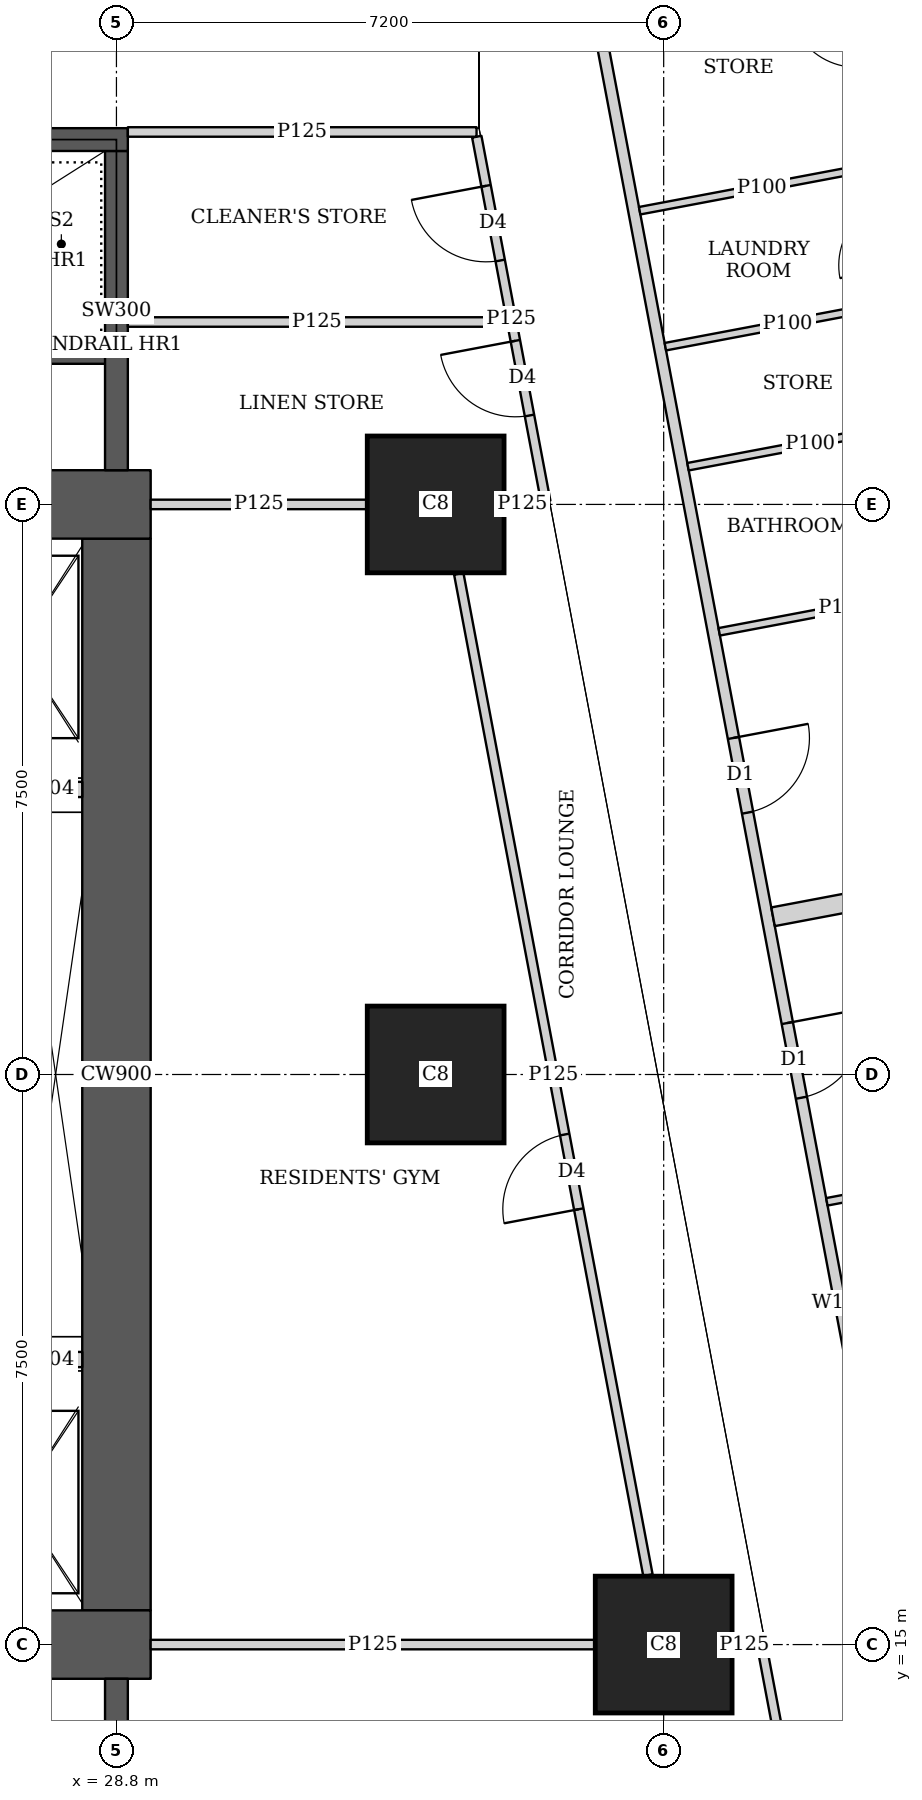
"""IFC4 building model, lengths in metres.
Left out: names, types, materials, properties, quantities, classifications, styles, units other than length and angle.
Written with IfcOpenShell. Run it as: python <this file> out.ifc"""

import sys

from ifc_helpers import new_model, si_unit, direction, frame, frame_2d, origin, origin_2d, place, context, subcontext, project, spatial, rectangle, extrude, element, fill, save


model = new_model("IFC4")
c1 = context("Model", 3, precision=1e-05, world=origin(), true_north=direction((0.0, 1.0)))
c2 = subcontext(c1, "Body", "Model", "MODEL_VIEW")
j1 = project(units=[si_unit("LENGTHUNIT", "METRE"), si_unit("PLANEANGLEUNIT", "RADIAN")], contexts=[c1])
p1 = place(None, origin())
s1 = spatial("IfcSite", under=j1, at=p1, CompositionType="ELEMENT")
p2 = place(p1, origin())
s2 = spatial("IfcBuilding", under=s1, at=p2, CompositionType="ELEMENT")
p3 = place(p2, frame((0.0, 0.0, 53.75)))
s3 = spatial("IfcBuildingStorey", under=s2, at=p3, CompositionType="ELEMENT", Elevation=53.75)
for number, where, z_axis, x_axis in (
    (1, (36.0, 15.0, 0.0), (0.0, 0.0, 1.0), (1.0, 0.0, 0.0)),
    (2, (33.0, 22.5, 0.0), (0.0, 0.0, 1.0), (1.0, 0.0, 0.0)),
    (3, (33.0, 30.0, 0.0), (0.0, 0.0, 1.0), (1.0, 0.0, 0.0)),
):
    element("IfcColumn", number, at=place(p3, frame(where, z_axis=z_axis, x_axis=x_axis)), inside=s3, PredefinedType="COLUMN", context=c2, shape_type="SweptSolid", body=[
        extrude(rectangle(XDim=1.8, YDim=1.8, at=origin_2d()), origin(), (0.0, 0.0, 1.0), 3.75),
    ])
p4 = place(p3, frame((13.95, 15.0, 0.0), z_axis=(0.0, 0.0, 1.0), x_axis=(1.0, 0.0, 0.0)))
e4 = element("IfcWall", 4, at=p4, inside=s3, PredefinedType="SHEAR", context=c2, shape_type="SweptSolid", body=[
    extrude(rectangle(XDim=15.3, YDim=0.9, at=frame_2d((7.65, 0.0))), origin(), (0.0, 0.0, 1.0), 3.75),
])
p5 = place(p4, frame((4.45, 0.0, 0.0)))
e5 = element("IfcOpeningElement", 5, at=p5, cuts=e4, PredefinedType="OPENING", context=c2, shape_type="SweptSolid", body=[
    extrude(rectangle(XDim=1.8, YDim=2.1, at=frame_2d((0.9, 1.05))), frame((0.0, 0.46, 0.0), z_axis=(0.0, -1.0, 0.0), x_axis=(1.0, 0.0, 0.0)), (0.0, 0.0, 1.0), 0.92),
])
p6 = place(p4, frame((10.7, 0.0, 0.0)))
e6 = element("IfcOpeningElement", 6, at=p6, cuts=e4, PredefinedType="OPENING", context=c2, shape_type="SweptSolid", body=[
    extrude(rectangle(XDim=1.1, YDim=2.1, at=frame_2d((0.55, 1.05))), frame((0.0, 0.46, 0.0), z_axis=(0.0, -1.0, 0.0), x_axis=(1.0, 0.0, 0.0)), (0.0, 0.0, 1.0), 0.92),
])
p7 = place(p3, frame((13.95, 30.0, 0.0), z_axis=(0.0, 0.0, 1.0), x_axis=(1.0, 0.0, 0.0)))
e7 = element("IfcWall", 7, at=p7, inside=s3, PredefinedType="SHEAR", context=c2, shape_type="SweptSolid", body=[
    extrude(rectangle(XDim=15.3, YDim=0.9, at=frame_2d((7.65, 0.0))), origin(), (0.0, 0.0, 1.0), 3.75),
])
p8 = place(p7, frame((4.45, 0.0, 0.0)))
e8 = element("IfcOpeningElement", 8, at=p8, cuts=e7, PredefinedType="OPENING", context=c2, shape_type="SweptSolid", body=[
    extrude(rectangle(XDim=1.8, YDim=2.1, at=frame_2d((0.9, 1.05))), frame((0.0, 0.46, 0.0), z_axis=(0.0, -1.0, 0.0), x_axis=(1.0, 0.0, 0.0)), (0.0, 0.0, 1.0), 0.92),
])
p9 = place(p7, frame((10.7, 0.0, 0.0)))
e9 = element("IfcOpeningElement", 9, at=p9, cuts=e7, PredefinedType="OPENING", context=c2, shape_type="SweptSolid", body=[
    extrude(rectangle(XDim=1.1, YDim=2.1, at=frame_2d((0.55, 1.05))), frame((0.0, 0.46, 0.0), z_axis=(0.0, -1.0, 0.0), x_axis=(1.0, 0.0, 0.0)), (0.0, 0.0, 1.0), 0.92),
])
p10 = place(p3, frame((28.8, 15.45, 0.0), z_axis=(0.0, 0.0, 1.0), x_axis=(0.0, 1.0, 0.0)))
e10 = element("IfcWall", 10, at=p10, inside=s3, PredefinedType="SHEAR", context=c2, shape_type="SweptSolid", body=[
    extrude(rectangle(XDim=14.1, YDim=0.9, at=frame_2d((7.05, 0.0))), origin(), (0.0, 0.0, 1.0), 3.75),
])
p11 = place(p3, frame((28.8, 10.35, 0.0), z_axis=(0.0, 0.0, 1.0), x_axis=(0.0, 1.0, 0.0)))
e11 = element("IfcWall", 11, at=p11, inside=s3, PredefinedType="SHEAR", context=c2, shape_type="SweptSolid", body=[
    extrude(rectangle(XDim=4.2, YDim=0.3, at=frame_2d((2.1, 0.0))), origin(), (0.0, 0.0, 1.0), 3.75),
])
p12 = place(p3, frame((21.45, 34.8, 0.0), z_axis=(0.0, 0.0, 1.0), x_axis=(1.0, 0.0, 0.0)))
e12 = element("IfcWall", 12, at=p12, inside=s3, PredefinedType="SHEAR", context=c2, shape_type="SweptSolid", body=[
    extrude(rectangle(XDim=7.5, YDim=0.3, at=frame_2d((3.75, 0.0))), origin(), (0.0, 0.0, 1.0), 3.75),
])
p13 = place(p12, frame((0.5, 0.0, 0.0)))
e13 = element("IfcOpeningElement", 13, at=p13, cuts=e12, PredefinedType="OPENING", context=c2, shape_type="SweptSolid", body=[
    extrude(rectangle(XDim=1.1, YDim=2.1, at=frame_2d((0.55, 1.05))), frame((0.0, 0.16, 0.0), z_axis=(0.0, -1.0, 0.0), x_axis=(1.0, 0.0, 0.0)), (0.0, 0.0, 1.0), 0.32),
])
p14 = place(p3, frame((28.8, 30.45, 0.0), z_axis=(0.0, 0.0, 1.0), x_axis=(0.0, 1.0, 0.0)))
e14 = element("IfcWall", 14, at=p14, inside=s3, PredefinedType="SHEAR", context=c2, shape_type="SweptSolid", body=[
    extrude(rectangle(XDim=4.2, YDim=0.3, at=frame_2d((2.1, 0.0))), origin(), (0.0, 0.0, 1.0), 3.75),
])
p15 = place(p3, frame((35.094, 36.585, 0.0), z_axis=(0.0, 0.0, 1.0), x_axis=(0.185588860311, -0.982627485331, 0.0)))
e15 = element("IfcWall", 15, at=p15, inside=s3, PredefinedType="SOLIDWALL", context=c2, shape_type="SweptSolid", body=[
    extrude(rectangle(XDim=34.797, YDim=0.15, at=frame_2d((17.399, 0.0))), origin(), (0.0, 0.0, 1.0), 2.5),
])
p16 = place(p15, frame((9.828, 0.0, 0.0)))
e16 = element("IfcOpeningElement", 16, at=p16, cuts=e15, PredefinedType="OPENING", context=c2, shape_type="SweptSolid", body=[
    extrude(rectangle(XDim=1.0, YDim=2.1, at=frame_2d((0.5, 1.05))), frame((0.0, 0.085, 0.0), z_axis=(0.0, -1.0, 0.0), x_axis=(1.0, 0.0, 0.0)), (0.0, 0.0, 1.0), 0.17),
])
p17 = place(p15, frame((13.645, 0.0, 0.0)))
e17 = element("IfcOpeningElement", 17, at=p17, cuts=e15, PredefinedType="OPENING", context=c2, shape_type="SweptSolid", body=[
    extrude(rectangle(XDim=1.0, YDim=2.1, at=frame_2d((0.5, 1.05))), frame((0.0, 0.085, 0.0), z_axis=(0.0, -1.0, 0.0), x_axis=(1.0, 0.0, 0.0)), (0.0, 0.0, 1.0), 0.17),
])
p18 = place(p15, frame((25.9, 0.0, 0.0)))
e18 = element("IfcOpeningElement", 18, at=p18, cuts=e15, PredefinedType="OPENING", context=c2, shape_type="SweptSolid", body=[
    extrude(rectangle(XDim=1.0, YDim=2.1, at=frame_2d((0.5, 1.05))), frame((0.0, 0.085, 0.0), z_axis=(0.0, -1.0, 0.0), x_axis=(1.0, 0.0, 0.0)), (0.0, 0.0, 1.0), 0.17),
])
p19 = place(p3, frame((37.514, 42.089, 0.0), z_axis=(0.0, 0.0, 1.0), x_axis=(0.1856087397, -0.982623730503, 0.0)))
e19 = element("IfcWall", 19, at=p19, inside=s3, PredefinedType="PARTITIONING", context=c2, shape_type="SweptSolid", body=[
    extrude(rectangle(XDim=13.33, YDim=0.1, at=frame_2d((6.665, 0.0))), origin(), (0.0, 0.0, 1.0), 2.5),
])
p20 = place(p19, frame((11.825, 0.0, 0.0)))
e20 = element("IfcOpeningElement", 20, at=p20, cuts=e19, PredefinedType="OPENING", context=c2, shape_type="SweptSolid", body=[
    extrude(rectangle(XDim=0.9, YDim=2.1, at=frame_2d((0.45, 1.05))), frame((0.0, 0.06, 0.0), z_axis=(0.0, -1.0, 0.0), x_axis=(1.0, 0.0, 0.0)), (0.0, 0.0, 1.0), 0.12),
])
p21 = place(p19, frame((8.203, 0.0, 0.0)))
e21 = element("IfcOpeningElement", 21, at=p21, cuts=e19, PredefinedType="OPENING", context=c2, shape_type="SweptSolid", body=[
    extrude(rectangle(XDim=0.9, YDim=2.1, at=frame_2d((0.45, 1.05))), frame((0.0, 0.06, 0.0), z_axis=(0.0, -1.0, 0.0), x_axis=(1.0, 0.0, 0.0)), (0.0, 0.0, 1.0), 0.12),
])
p22 = place(p19, frame((2.63, 0.0, 0.0)))
e22 = element("IfcOpeningElement", 22, at=p22, cuts=e19, PredefinedType="OPENING", context=c2, shape_type="SweptSolid", body=[
    extrude(rectangle(XDim=0.9, YDim=2.1, at=frame_2d((0.45, 1.05))), frame((0.0, 0.06, 0.0), z_axis=(0.0, -1.0, 0.0), x_axis=(1.0, 0.0, 0.0)), (0.0, 0.0, 1.0), 0.12),
])
p23 = place(p19, frame((9.916, 0.0, 0.0)))
e23 = element("IfcOpeningElement", 23, at=p23, cuts=e19, PredefinedType="OPENING", context=c2, shape_type="SweptSolid", body=[
    extrude(rectangle(XDim=0.9, YDim=2.1, at=frame_2d((0.45, 1.05))), frame((0.0, 0.06, 0.0), z_axis=(0.0, -1.0, 0.0), x_axis=(1.0, 0.0, 0.0)), (0.0, 0.0, 1.0), 0.12),
])
p24 = place(p19, frame((5.535, 0.0, 0.0)))
e24 = element("IfcOpeningElement", 24, at=p24, cuts=e19, PredefinedType="OPENING", context=c2, shape_type="SweptSolid", body=[
    extrude(rectangle(XDim=0.9, YDim=2.1, at=frame_2d((0.45, 1.05))), frame((0.0, 0.06, 0.0), z_axis=(0.0, -1.0, 0.0), x_axis=(1.0, 0.0, 0.0)), (0.0, 0.0, 1.0), 0.12),
])
p25 = place(p3, frame((39.24, 32.683, 0.0), z_axis=(0.0, 0.0, 1.0), x_axis=(-0.982607026909, -0.185697147715, 0.0)))
e25 = element("IfcWall", 25, at=p25, inside=s3, PredefinedType="PARTITIONING", context=c2, shape_type="SweptSolid", body=[
    extrude(rectangle(XDim=3.275, YDim=0.1, at=frame_2d((1.637, 0.0))), origin(), (0.0, 0.0, 1.0), 3.5),
])
p26 = place(p3, frame((39.997, 28.942, 0.0), z_axis=(0.0, 0.0, 1.0), x_axis=(-0.982569883123, -0.185893584556, 0.0)))
e26 = element("IfcWall", 26, at=p26, inside=s3, PredefinedType="PARTITIONING", context=c2, shape_type="SweptSolid", body=[
    extrude(rectangle(XDim=3.324, YDim=0.1, at=frame_2d((1.662, 0.0))), origin(), (0.0, 0.0, 1.0), 3.5),
])
p27 = place(p3, frame((39.538, 31.104, 0.0), z_axis=(0.0, 0.0, 1.0), x_axis=(-0.982620626894, -0.185625169636, 0.0)))
e27 = element("IfcWall", 27, at=p27, inside=s3, PredefinedType="PARTITIONING", context=c2, shape_type="SweptSolid", body=[
    extrude(rectangle(XDim=3.275, YDim=0.1, at=frame_2d((1.637, 0.0))), origin(), (0.0, 0.0, 1.0), 2.5),
])
p28 = place(p3, frame((38.902, 34.471, 0.0), z_axis=(0.0, 0.0, 1.0), x_axis=(-0.982674977865, -0.185337227447, 0.0)))
e28 = element("IfcWall", 28, at=p28, inside=s3, PredefinedType="PARTITIONING", context=c2, shape_type="SweptSolid", body=[
    extrude(rectangle(XDim=3.275, YDim=0.1, at=frame_2d((1.637, 0.0))), origin(), (0.0, 0.0, 1.0), 3.5),
])
p29 = place(p3, frame((41.365, 21.433, 0.0), z_axis=(0.0, 0.0, 1.0), x_axis=(-0.982607026909, -0.185697147715, 0.0)))
e29 = element("IfcWall", 29, at=p29, inside=s3, PredefinedType="PARTITIONING", context=c2, shape_type="SweptSolid", body=[
    extrude(rectangle(XDim=3.275, YDim=0.1, at=frame_2d((1.637, 0.0))), origin(), (0.0, 0.0, 1.0), 3.5),
])
p30 = place(p3, frame((41.885, 25.415, 0.0), z_axis=(0.0, 0.0, 1.0), x_axis=(-0.982612837616, -0.185666398014, 0.0)))
e30 = element("IfcWall", 30, at=p30, inside=s3, PredefinedType="SOLIDWALL", context=c2, shape_type="SweptSolid", body=[
    extrude(rectangle(XDim=4.525, YDim=0.25, at=frame_2d((2.262, 0.0))), origin(), (0.0, 0.0, 1.0), 3.5),
])
p31 = place(p3, frame((28.95, 34.9, 0.0), z_axis=(0.0, 0.0, 1.0), x_axis=(1.0, 0.0, 0.0)))
e31 = element("IfcWall", 31, at=p31, inside=s3, PredefinedType="PARTITIONING", context=c2, shape_type="SweptSolid", body=[
    extrude(rectangle(XDim=4.588, YDim=0.125, at=frame_2d((2.294, 0.0))), origin(), (0.0, 0.0, 1.0), 3.5),
])
p32 = place(p3, frame((38.202, 10.163, 0.0), z_axis=(0.0, 0.0, 1.0), x_axis=(-0.185641892853, 0.982617467593, 0.0)))
e32 = element("IfcWall", 32, at=p32, inside=s3, PredefinedType="PARTITIONING", context=c2, shape_type="SweptSolid", body=[
    extrude(rectangle(XDim=4.922, YDim=0.125, at=frame_2d((2.461, 0.0))), origin(), (0.0, 0.0, 1.0), 3.5),
])
p33 = place(p32, frame((0.708, 0.0, 0.0)))
e33 = element("IfcOpeningElement", 33, at=p33, cuts=e32, PredefinedType="OPENING", context=c2, shape_type="SweptSolid", body=[
    extrude(rectangle(XDim=1.0, YDim=2.1, at=frame_2d((0.5, 1.05))), frame((0.0, 0.073, 0.0), z_axis=(0.0, -1.0, 0.0), x_axis=(1.0, 0.0, 0.0)), (0.0, 0.0, 1.0), 0.145),
])
p34 = place(p3, frame((34.448, 30.04, 0.0), z_axis=(0.0, 0.0, 1.0), x_axis=(-0.185749459238, 0.982597139418, 0.0)))
e34 = element("IfcWall", 34, at=p34, inside=s3, PredefinedType="PARTITIONING", context=c2, shape_type="SweptSolid", body=[
    extrude(rectangle(XDim=4.883, YDim=0.125, at=frame_2d((2.441, 0.0))), origin(), (0.0, 0.0, 1.0), 2.5),
])
p35 = place(p34, frame((1.15, 0.0, 0.0)))
e35 = element("IfcOpeningElement", 35, at=p35, cuts=e34, PredefinedType="OPENING", context=c2, shape_type="SweptSolid", body=[
    extrude(rectangle(XDim=1.0, YDim=2.1, at=frame_2d((0.5, 1.05))), frame((0.0, 0.073, 0.0), z_axis=(0.0, -1.0, 0.0), x_axis=(1.0, 0.0, 0.0)), (0.0, 0.0, 1.0), 0.145),
])
p36 = place(p34, frame((3.225, 0.0, 0.0)))
e36 = element("IfcOpeningElement", 36, at=p36, cuts=e34, PredefinedType="OPENING", context=c2, shape_type="SweptSolid", body=[
    extrude(rectangle(XDim=1.0, YDim=2.1, at=frame_2d((0.5, 1.05))), frame((0.0, 0.073, 0.0), z_axis=(0.0, -1.0, 0.0), x_axis=(1.0, 0.0, 0.0)), (0.0, 0.0, 1.0), 0.145),
])
p37 = place(p3, frame((35.793, 15.913, 0.0), z_axis=(0.0, 0.0, 1.0), x_axis=(-0.185651708232, 0.982615613162, 0.0)))
e37 = element("IfcWall", 37, at=p37, inside=s3, PredefinedType="PARTITIONING", context=c2, shape_type="SweptSolid", body=[
    extrude(rectangle(XDim=13.407, YDim=0.125, at=frame_2d((6.704, 0.0))), origin(), (0.0, 0.0, 1.0), 2.5),
])
p38 = place(p37, frame((4.9, 0.0, 0.0)))
e38 = element("IfcOpeningElement", 38, at=p38, cuts=e37, PredefinedType="OPENING", context=c2, shape_type="SweptSolid", body=[
    extrude(rectangle(XDim=1.0, YDim=2.1, at=frame_2d((0.5, 1.05))), frame((0.0, 0.073, 0.0), z_axis=(0.0, -1.0, 0.0), x_axis=(1.0, 0.0, 0.0)), (0.0, 0.0, 1.0), 0.145),
])
p39 = place(p3, frame((29.25, 15.0, 0.0), z_axis=(0.0, 0.0, 1.0), x_axis=(1.0, 0.0, 0.0)))
e39 = element("IfcWall", 39, at=p39, inside=s3, PredefinedType="PARTITIONING", context=c2, shape_type="SweptSolid", body=[
    extrude(rectangle(XDim=5.849, YDim=0.125, at=frame_2d((2.925, 0.0))), origin(), (0.0, 0.0, 1.0), 3.5),
])
p40 = place(p3, frame((36.901, 15.0, 0.0), z_axis=(0.0, 0.0, 1.0), x_axis=(1.0, 0.0, 0.0)))
e40 = element("IfcWall", 40, at=p40, inside=s3, PredefinedType="PARTITIONING", context=c2, shape_type="SweptSolid", body=[
    extrude(rectangle(XDim=0.326, YDim=0.125, at=frame_2d((0.163, 0.0))), origin(), (0.0, 0.0, 1.0), 3.5),
])
p41 = place(p3, frame((29.25, 30.0, 0.0), z_axis=(0.0, 0.0, 1.0), x_axis=(1.0, 0.0, 0.0)))
e41 = element("IfcWall", 41, at=p41, inside=s3, PredefinedType="PARTITIONING", context=c2, shape_type="SweptSolid", body=[
    extrude(rectangle(XDim=2.849, YDim=0.125, at=frame_2d((1.425, 0.0))), origin(), (0.0, 0.0, 1.0), 3.5),
])
p42 = place(p3, frame((33.901, 30.0, 0.0), z_axis=(0.0, 0.0, 1.0), x_axis=(1.0, 0.0, 0.0)))
e42 = element("IfcWall", 42, at=p42, inside=s3, PredefinedType="PARTITIONING", context=c2, shape_type="SweptSolid", body=[
    extrude(rectangle(XDim=0.479, YDim=0.125, at=frame_2d((0.24, 0.0))), origin(), (0.0, 0.0, 1.0), 2.5),
])
p43 = place(p3, frame((28.95, 32.4, 0.0), z_axis=(0.0, 0.0, 1.0), x_axis=(1.0, 0.0, 0.0)))
e43 = element("IfcWall", 43, at=p43, inside=s3, PredefinedType="PARTITIONING", context=c2, shape_type="SweptSolid", body=[
    extrude(rectangle(XDim=4.976, YDim=0.125, at=frame_2d((2.488, 0.0))), origin(), (0.0, 0.0, 1.0), 3.5),
])
p44 = place(p3, frame((23.0, 31.95, 0.0), z_axis=(0.0, 0.0, 1.0), x_axis=(1.0, 0.0, 0.0)))
e44 = element("IfcWall", 44, at=p44, inside=s3, PredefinedType="SHEAR", context=c2, shape_type="SweptSolid", body=[
    extrude(rectangle(XDim=5.8, YDim=0.2, at=frame_2d((2.9, 0.0))), origin(), (0.0, 0.0, 1.0), 3.75),
])
for number, where, z_axis, x_axis in (
    (45, (27.4, 18.75, 0.0), (0.0, 0.0, 1.0), (1.0, 0.0, 0.0)),
    (46, (27.4, 26.25, 0.0), (0.0, 0.0, 1.0), (1.0, 0.0, 0.0)),
):
    element("IfcWall", number, at=place(p3, frame(where, z_axis=z_axis, x_axis=x_axis)), inside=s3, PredefinedType="SOLIDWALL", context=c2, shape_type="SweptSolid", body=[
        extrude(rectangle(XDim=0.95, YDim=0.2, at=frame_2d((0.475, 0.0))), origin(), (0.0, 0.0, 1.0), 3.5),
    ])
p45 = place(p16, origin())
e47 = element("IfcDoor", 47, at=p45, inside=s3, OperationType="SINGLE_SWING_LEFT", PredefinedType="DOOR", context=c2, shape_type="SweptSolid", body=[
    extrude(rectangle(XDim=1.0, YDim=2.1, at=frame_2d((0.5, 1.05))), frame((0.0, 0.025, 0.0), z_axis=(0.0, -1.0, 0.0), x_axis=(1.0, 0.0, 0.0)), (0.0, 0.0, 1.0), 0.05),
])
fill(e16, e47)
p46 = place(p17, origin())
e48 = element("IfcDoor", 48, at=p46, inside=s3, OperationType="SINGLE_SWING_LEFT", PredefinedType="DOOR", context=c2, shape_type="SweptSolid", body=[
    extrude(rectangle(XDim=1.0, YDim=2.1, at=frame_2d((0.5, 1.05))), frame((0.0, 0.025, 0.0), z_axis=(0.0, -1.0, 0.0), x_axis=(1.0, 0.0, 0.0)), (0.0, 0.0, 1.0), 0.05),
])
fill(e17, e48)
p47 = place(p38, origin())
e49 = element("IfcDoor", 49, at=p47, inside=s3, OperationType="SINGLE_SWING_LEFT", PredefinedType="DOOR", context=c2, shape_type="SweptSolid", body=[
    extrude(rectangle(XDim=1.0, YDim=2.1, at=frame_2d((0.5, 1.05))), frame((0.0, 0.025, 0.0), z_axis=(0.0, -1.0, 0.0), x_axis=(1.0, 0.0, 0.0)), (0.0, 0.0, 1.0), 0.05),
])
fill(e38, e49)
p48 = place(p35, origin())
e50 = element("IfcDoor", 50, at=p48, inside=s3, OperationType="SINGLE_SWING_RIGHT", PredefinedType="DOOR", context=c2, shape_type="SweptSolid", body=[
    extrude(rectangle(XDim=1.0, YDim=2.1, at=frame_2d((0.5, 1.05))), frame((0.0, 0.025, 0.0), z_axis=(0.0, -1.0, 0.0), x_axis=(1.0, 0.0, 0.0)), (0.0, 0.0, 1.0), 0.05),
])
fill(e35, e50)
p49 = place(p36, origin())
e51 = element("IfcDoor", 51, at=p49, inside=s3, OperationType="SINGLE_SWING_RIGHT", PredefinedType="DOOR", context=c2, shape_type="SweptSolid", body=[
    extrude(rectangle(XDim=1.0, YDim=2.1, at=frame_2d((0.5, 1.05))), frame((0.0, 0.025, 0.0), z_axis=(0.0, -1.0, 0.0), x_axis=(1.0, 0.0, 0.0)), (0.0, 0.0, 1.0), 0.05),
])
fill(e36, e51)
save(model, sys.argv[1])
